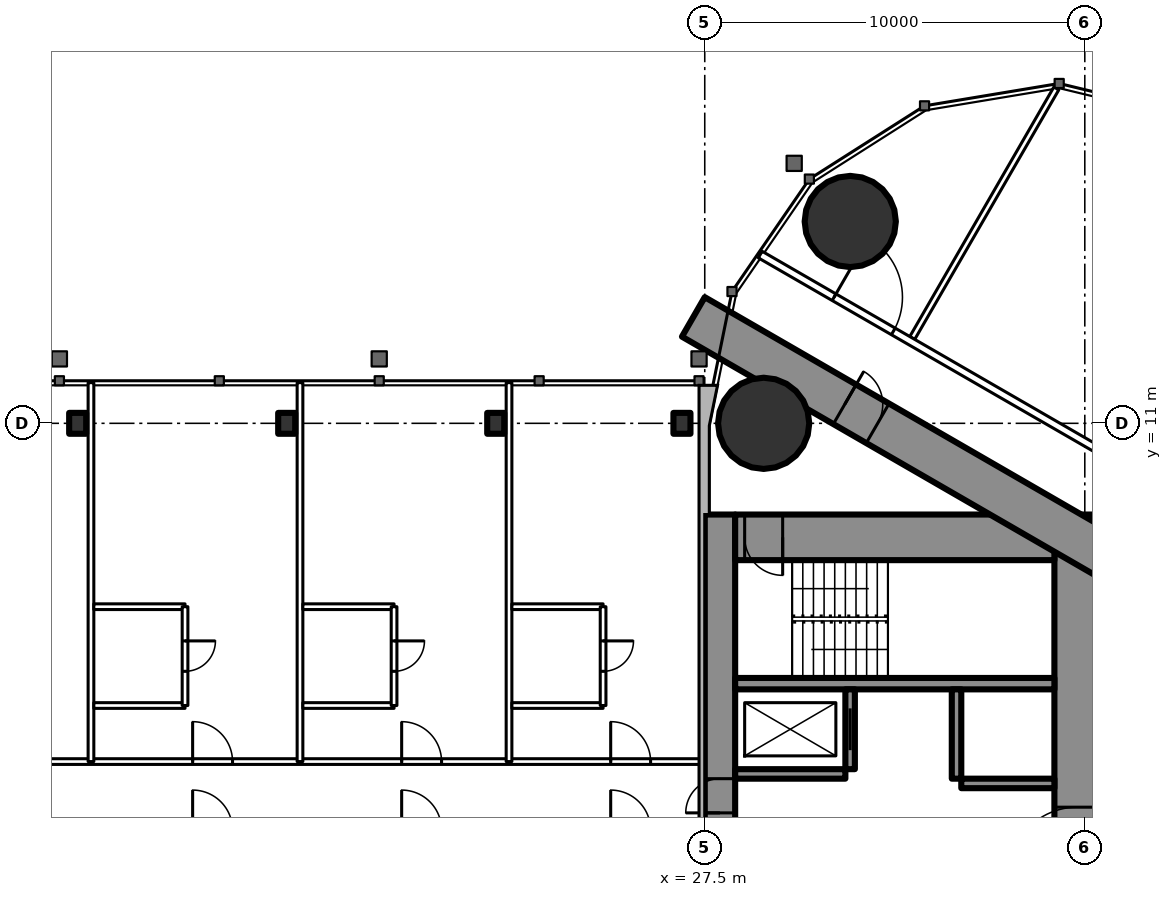
"""IFC4 building model, lengths in metres.
Left out: names, types, materials, properties, quantities, classifications, styles, units other than length and angle.
Written with IfcOpenShell. Run it as: python <this file> out.ifc"""

import sys

from ifc_helpers import new_model, si_unit, direction, frame, frame_2d, origin, origin_2d, place, context, subcontext, project, spatial, rectangle, circle, i_section, extrude, element, fill, save


model = new_model("IFC4")
c1 = context("Model", 3, precision=1e-05, world=origin(), true_north=direction((0.0, 1.0)))
c2 = subcontext(c1, "Body", "Model", "MODEL_VIEW")
j1 = project(units=[si_unit("LENGTHUNIT", "METRE"), si_unit("PLANEANGLEUNIT", "RADIAN")], contexts=[c1])
p1 = place(None, origin())
s1 = spatial("IfcSite", under=j1, at=p1, CompositionType="ELEMENT")
p2 = place(p1, origin())
s2 = spatial("IfcBuilding", under=s1, at=p2, CompositionType="ELEMENT")
p3 = place(p2, frame((0.0, 0.0, 244.1)))
s3 = spatial("IfcBuildingStorey", under=s2, at=p3, CompositionType="ELEMENT", Elevation=244.1)
for number, where, z_axis, x_axis in (
    (1, (31.328, 16.311, 0.0), (0.0, 0.0, 1.0), (1.0, 0.0, 0.0)),
    (2, (29.05, 11.0, 0.0), (0.0, 0.0, 1.0), (1.0, 0.0, 0.0)),
):
    element("IfcColumn", number, at=place(p3, frame(where, z_axis=z_axis, x_axis=x_axis)), inside=s3, PredefinedType="COLUMN", context=c2, shape_type="SweptSolid", body=[
        extrude(circle(Radius=1.2, at=origin_2d()), origin(), (0.0, 0.0, 1.0), 3.6),
    ])
p4 = place(p3, frame((27.9, -8.6, 0.0), z_axis=(0.0, 0.0, 1.0), x_axis=(0.0, 1.0, 0.0)))
e3 = element("IfcWall", 3, at=p4, inside=s3, PredefinedType="SHEAR", context=c2, shape_type="SweptSolid", body=[
    extrude(rectangle(XDim=17.2, YDim=0.8, at=frame_2d((8.6, 0.0))), origin(), (0.0, 0.0, 1.0), 3.6),
])
p5 = place(p4, frame((9.35, 0.0, 0.0)))
e4 = element("IfcOpeningElement", 4, at=p5, cuts=e3, PredefinedType="OPENING", context=c2, shape_type="SweptSolid", body=[
    extrude(rectangle(XDim=0.9, YDim=2.2, at=frame_2d((0.45, 1.1))), frame((0.0, 0.41, 0.0), z_axis=(0.0, -1.0, 0.0), x_axis=(1.0, 0.0, 0.0)), (0.0, 0.0, 1.0), 0.82),
])
p6 = place(p3, frame((37.3, -8.6, 0.0), z_axis=(0.0, 0.0, 1.0), x_axis=(0.0, 1.0, 0.0)))
e5 = element("IfcWall", 5, at=p6, inside=s3, PredefinedType="SHEAR", context=c2, shape_type="SweptSolid", body=[
    extrude(rectangle(XDim=17.2, YDim=1.2, at=frame_2d((8.6, 0.0))), origin(), (0.0, 0.0, 1.0), 3.6),
])
p7 = place(p6, frame((7.7, 0.0, 0.0)))
e6 = element("IfcOpeningElement", 6, at=p7, cuts=e5, PredefinedType="OPENING", context=c2, shape_type="SweptSolid", body=[
    extrude(rectangle(XDim=1.8, YDim=2.2, at=frame_2d((0.9, 1.1))), frame((0.0, 0.61, 0.0), z_axis=(0.0, -1.0, 0.0), x_axis=(1.0, 0.0, 0.0)), (0.0, 0.0, 1.0), 1.22),
])
p8 = place(p3, frame((28.3, 8.0, 0.0), z_axis=(0.0, 0.0, 1.0), x_axis=(1.0, 0.0, 0.0)))
e7 = element("IfcWall", 7, at=p8, inside=s3, PredefinedType="SHEAR", context=c2, shape_type="SweptSolid", body=[
    extrude(rectangle(XDim=8.4, YDim=1.2, at=frame_2d((4.2, 0.0))), origin(), (0.0, 0.0, 1.0), 3.6),
])
p9 = place(p8, frame((0.25, 0.0, 0.0)))
e8 = element("IfcOpeningElement", 8, at=p9, cuts=e7, PredefinedType="OPENING", context=c2, shape_type="SweptSolid", body=[
    extrude(rectangle(XDim=1.0, YDim=2.2, at=frame_2d((0.5, 1.1))), frame((0.0, 0.61, 0.0), z_axis=(0.0, -1.0, 0.0), x_axis=(1.0, 0.0, 0.0)), (0.0, 0.0, 1.0), 1.22),
])
p10 = place(p3, frame((28.3, 4.15, 0.0), z_axis=(0.0, 0.0, 1.0), x_axis=(1.0, 0.0, 0.0)))
e9 = element("IfcWall", 9, at=p10, inside=s3, PredefinedType="SHEAR", context=c2, shape_type="SweptSolid", body=[
    extrude(rectangle(XDim=8.4, YDim=0.3, at=frame_2d((4.2, 0.0))), origin(), (0.0, 0.0, 1.0), 3.6),
])
p11 = place(p3, frame((31.325, 1.9, 0.0), z_axis=(0.0, 0.0, 1.0), x_axis=(0.0, 1.0, 0.0)))
e10 = element("IfcWall", 10, at=p11, inside=s3, PredefinedType="SHEAR", context=c2, shape_type="SweptSolid", body=[
    extrude(rectangle(XDim=2.1, YDim=0.25, at=frame_2d((1.05, 0.0))), origin(), (0.0, 0.0, 1.0), 3.6),
])
p12 = place(p11, frame((0.5, 0.0, 0.0)))
e11 = element("IfcOpeningElement", 11, at=p12, cuts=e10, PredefinedType="OPENING", context=c2, shape_type="SweptSolid", body=[
    extrude(rectangle(XDim=1.1, YDim=2.2, at=frame_2d((0.55, 1.1))), frame((0.0, 0.135, 0.0), z_axis=(0.0, -1.0, 0.0), x_axis=(1.0, 0.0, 0.0)), (0.0, 0.0, 1.0), 0.27),
])
p13 = place(p3, frame((34.125, 1.65, 0.0), z_axis=(0.0, 0.0, 1.0), x_axis=(0.0, 1.0, 0.0)))
e12 = element("IfcWall", 12, at=p13, inside=s3, PredefinedType="SHEAR", context=c2, shape_type="SweptSolid", body=[
    extrude(rectangle(XDim=2.35, YDim=0.25, at=frame_2d((1.175, 0.0))), origin(), (0.0, 0.0, 1.0), 3.6),
])
p14 = place(p3, frame((28.3, 1.775, 0.0), z_axis=(0.0, 0.0, 1.0), x_axis=(1.0, 0.0, 0.0)))
e13 = element("IfcWall", 13, at=p14, inside=s3, PredefinedType="SHEAR", context=c2, shape_type="SweptSolid", body=[
    extrude(rectangle(XDim=2.9, YDim=0.25, at=frame_2d((1.45, 0.0))), origin(), (0.0, 0.0, 1.0), 3.6),
])
p15 = place(p3, frame((34.25, 1.525, 0.0), z_axis=(0.0, 0.0, 1.0), x_axis=(1.0, 0.0, 0.0)))
e14 = element("IfcWall", 14, at=p15, inside=s3, PredefinedType="SHEAR", context=c2, shape_type="SweptSolid", body=[
    extrude(rectangle(XDim=2.45, YDim=0.25, at=frame_2d((1.225, 0.0))), origin(), (0.0, 0.0, 1.0), 3.6),
])
p16 = place(p3, frame((27.2, -13.8, 0.0), z_axis=(0.0, 0.0, 1.0), x_axis=(0.866027159892, 0.499996958321, 0.0)))
e15 = element("IfcWall", 15, at=p16, inside=s3, PredefinedType="SHEAR", context=c2, shape_type="SweptSolid", body=[
    extrude(rectangle(XDim=27.947, YDim=1.2, at=frame_2d((13.973, 0.0))), origin(), (0.0, 0.0, 1.0), 3.6),
])
p17 = place(p16, frame((4.6, 0.0, 0.0)))
e16 = element("IfcOpeningElement", 16, at=p17, cuts=e15, PredefinedType="OPENING", context=c2, shape_type="SweptSolid", body=[
    extrude(rectangle(XDim=1.0, YDim=2.2, at=frame_2d((0.5, 1.1))), frame((0.0, 0.61, 0.0), z_axis=(0.0, -1.0, 0.0), x_axis=(1.0, 0.0, 0.0)), (0.0, 0.0, 1.0), 1.22),
])
p18 = place(p16, frame((13.395, 0.0, 0.0)))
e17 = element("IfcOpeningElement", 17, at=p18, cuts=e15, PredefinedType="OPENING", context=c2, shape_type="SweptSolid", body=[
    extrude(rectangle(XDim=1.8, YDim=2.2, at=frame_2d((0.9, 1.1))), frame((0.0, 0.61, 0.0), z_axis=(0.0, -1.0, 0.0), x_axis=(1.0, 0.0, 0.0)), (0.0, 0.0, 1.0), 1.22),
])
p19 = place(p3, frame((27.2, 13.8, 0.0), z_axis=(0.0, 0.0, 1.0), x_axis=(0.866024515034, -0.500001539357, 0.0)))
e18 = element("IfcWall", 18, at=p19, inside=s3, PredefinedType="SHEAR", context=c2, shape_type="SweptSolid", body=[
    extrude(rectangle(XDim=26.907, YDim=1.2, at=frame_2d((13.454, 0.0))), origin(), (0.0, 0.0, 1.0), 3.6),
])
p20 = place(p19, frame((4.6, 0.0, 0.0)))
e19 = element("IfcOpeningElement", 19, at=p20, cuts=e18, PredefinedType="OPENING", context=c2, shape_type="SweptSolid", body=[
    extrude(rectangle(XDim=1.0, YDim=2.2, at=frame_2d((0.5, 1.1))), frame((0.0, 0.61, 0.0), z_axis=(0.0, -1.0, 0.0), x_axis=(1.0, 0.0, 0.0)), (0.0, 0.0, 1.0), 1.22),
])
p21 = place(p19, frame((13.395, 0.0, 0.0)))
e20 = element("IfcOpeningElement", 20, at=p21, cuts=e18, PredefinedType="OPENING", context=c2, shape_type="SweptSolid", body=[
    extrude(rectangle(XDim=1.8, YDim=2.2, at=frame_2d((0.9, 1.1))), frame((0.0, 0.61, 0.0), z_axis=(0.0, -1.0, 0.0), x_axis=(1.0, 0.0, 0.0)), (0.0, 0.0, 1.0), 1.22),
])
for number, where, z_axis, x_axis in (
    (21, (11.0, 11.0, 0.0), (0.0, 0.0, 1.0), (1.0, 0.0, 0.0)),
    (22, (16.5, 11.0, 0.0), (0.0, 0.0, 1.0), (1.0, 0.0, 0.0)),
    (23, (22.0, 11.0, 0.0), (0.0, 0.0, 1.0), (1.0, 0.0, 0.0)),
    (24, (26.9, 11.0, 0.0), (0.0, 0.0, 1.0), (1.0, 0.0, 0.0)),
):
    element("IfcColumn", number, at=place(p3, frame(where, z_axis=z_axis, x_axis=x_axis)), inside=s3, PredefinedType="COLUMN", context=c2, shape_type="SweptSolid", body=[
        extrude(i_section(OverallWidth=0.448, OverallDepth=0.55, WebThickness=0.072, FlangeThickness=0.115, FilletRadius=0.02, at=origin_2d()), origin(), (0.0, 0.0, 1.0), 3.6),
    ])
p22 = place(p3, frame((32.96, 13.246, 0.0), z_axis=(0.0, 0.0, 1.0), x_axis=(0.500000236886, 0.866025267018, 0.0)))
e25 = element("IfcWall", 25, at=p22, inside=s3, PredefinedType="PARTITIONING", context=c2, shape_type="SweptSolid", body=[
    extrude(rectangle(XDim=7.583, YDim=0.15, at=frame_2d((3.791, 0.0))), origin(), (0.0, 0.0, 1.0), 3.35),
])
p23 = place(p3, frame((28.959, 15.44, 0.0), z_axis=(0.0, 0.0, 1.0), x_axis=(0.866028936079, -0.499993881836, 0.0)))
e26 = element("IfcWall", 26, at=p23, inside=s3, PredefinedType="PARTITIONING", context=c2, shape_type="SweptSolid", body=[
    extrude(rectangle(XDim=20.503, YDim=0.2, at=frame_2d((10.251, 0.0))), origin(), (0.0, 0.0, 1.0), 3.35),
])
p24 = place(p23, frame((18.953, 0.0, 0.0)))
e27 = element("IfcOpeningElement", 27, at=p24, cuts=e26, PredefinedType="OPENING", context=c2, shape_type="SweptSolid", body=[
    extrude(rectangle(XDim=0.95, YDim=2.2, at=frame_2d((0.475, 1.1))), frame((0.0, 0.11, 0.0), z_axis=(0.0, -1.0, 0.0), x_axis=(1.0, 0.0, 0.0)), (0.0, 0.0, 1.0), 0.22),
])
p25 = place(p23, frame((14.437, 0.0, 0.0)))
e28 = element("IfcOpeningElement", 28, at=p25, cuts=e26, PredefinedType="OPENING", context=c2, shape_type="SweptSolid", body=[
    extrude(rectangle(XDim=0.95, YDim=2.2, at=frame_2d((0.475, 1.1))), frame((0.0, 0.11, 0.0), z_axis=(0.0, -1.0, 0.0), x_axis=(1.0, 0.0, 0.0)), (0.0, 0.0, 1.0), 0.22),
])
p26 = place(p23, frame((2.244, 0.0, 0.0)))
e29 = element("IfcOpeningElement", 29, at=p26, cuts=e26, PredefinedType="OPENING", context=c2, shape_type="SweptSolid", body=[
    extrude(rectangle(XDim=1.8, YDim=2.04, at=frame_2d((0.9, 1.02))), frame((0.0, 0.11, 0.0), z_axis=(0.0, -1.0, 0.0), x_axis=(1.0, 0.0, 0.0)), (0.0, 0.0, 1.0), 0.22),
])
p27 = place(p3, frame((-10.65, 2.1, 0.0), z_axis=(0.0, 0.0, 1.0), x_axis=(1.0, 0.0, 0.0)))
e30 = element("IfcWall", 30, at=p27, inside=s3, PredefinedType="PARTITIONING", context=c2, shape_type="SweptSolid", body=[
    extrude(rectangle(XDim=38.15, YDim=0.15, at=frame_2d((19.075, 0.0))), origin(), (0.0, 0.0, 1.0), 3.4),
])
p28 = place(p27, frame((2.675, 0.0, 0.0)))
e31 = element("IfcOpeningElement", 31, at=p28, cuts=e30, PredefinedType="OPENING", context=c2, shape_type="SweptSolid", body=[
    extrude(rectangle(XDim=1.05, YDim=2.4, at=frame_2d((0.525, 1.2))), frame((0.0, 0.085, 0.0), z_axis=(0.0, -1.0, 0.0), x_axis=(1.0, 0.0, 0.0)), (0.0, 0.0, 1.0), 0.17),
])
p29 = place(p27, frame((13.675, 0.0, 0.0)))
e32 = element("IfcOpeningElement", 32, at=p29, cuts=e30, PredefinedType="OPENING", context=c2, shape_type="SweptSolid", body=[
    extrude(rectangle(XDim=1.05, YDim=2.4, at=frame_2d((0.525, 1.2))), frame((0.0, 0.085, 0.0), z_axis=(0.0, -1.0, 0.0), x_axis=(1.0, 0.0, 0.0)), (0.0, 0.0, 1.0), 0.17),
])
p30 = place(p27, frame((24.675, 0.0, 0.0)))
e33 = element("IfcOpeningElement", 33, at=p30, cuts=e30, PredefinedType="OPENING", context=c2, shape_type="SweptSolid", body=[
    extrude(rectangle(XDim=1.05, YDim=2.4, at=frame_2d((0.525, 1.2))), frame((0.0, 0.085, 0.0), z_axis=(0.0, -1.0, 0.0), x_axis=(1.0, 0.0, 0.0)), (0.0, 0.0, 1.0), 0.17),
])
p31 = place(p27, frame((30.175, 0.0, 0.0)))
e34 = element("IfcOpeningElement", 34, at=p31, cuts=e30, PredefinedType="OPENING", context=c2, shape_type="SweptSolid", body=[
    extrude(rectangle(XDim=1.05, YDim=2.4, at=frame_2d((0.525, 1.2))), frame((0.0, 0.085, 0.0), z_axis=(0.0, -1.0, 0.0), x_axis=(1.0, 0.0, 0.0)), (0.0, 0.0, 1.0), 0.17),
])
p32 = place(p27, frame((35.675, 0.0, 0.0)))
e35 = element("IfcOpeningElement", 35, at=p32, cuts=e30, PredefinedType="OPENING", context=c2, shape_type="SweptSolid", body=[
    extrude(rectangle(XDim=1.05, YDim=2.4, at=frame_2d((0.525, 1.2))), frame((0.0, 0.085, 0.0), z_axis=(0.0, -1.0, 0.0), x_axis=(1.0, 0.0, 0.0)), (0.0, 0.0, 1.0), 0.17),
])
for number, where, z_axis, x_axis in (
    (36, (11.35, 2.1, 0.0), (0.0, 0.0, 1.0), (0.0, 1.0, 0.0)),
    (37, (16.85, 2.1, 0.0), (0.0, 0.0, 1.0), (0.0, 1.0, 0.0)),
    (38, (22.35, 2.1, 0.0), (0.0, 0.0, 1.0), (0.0, 1.0, 0.0)),
):
    element("IfcWall", number, at=place(p3, frame(where, z_axis=z_axis, x_axis=x_axis)), inside=s3, PredefinedType="PARTITIONING", context=c2, shape_type="SweptSolid", body=[
        extrude(rectangle(XDim=9.97, YDim=0.15, at=frame_2d((4.985, 0.0))), origin(), (0.0, 0.0, 1.0), 3.4),
    ])
for number, where, z_axis, x_axis in (
    (39, (11.425, 6.175, 0.0), (0.0, 0.0, 1.0), (1.0, 0.0, 0.0)),
    (40, (11.425, 3.575, 0.0), (0.0, 0.0, 1.0), (1.0, 0.0, 0.0)),
):
    element("IfcWall", number, at=place(p3, frame(where, z_axis=z_axis, x_axis=x_axis)), inside=s3, PredefinedType="PARTITIONING", context=c2, shape_type="SweptSolid", body=[
        extrude(rectangle(XDim=2.4, YDim=0.15, at=frame_2d((1.2, 0.0))), origin(), (0.0, 0.0, 1.0), 3.4),
    ])
p33 = place(p3, frame((13.825, 3.575, 0.0), z_axis=(0.0, 0.0, 1.0), x_axis=(0.0, 1.0, 0.0)))
e41 = element("IfcWall", 41, at=p33, inside=s3, PredefinedType="PARTITIONING", context=c2, shape_type="SweptSolid", body=[
    extrude(rectangle(XDim=2.6, YDim=0.15, at=frame_2d((1.3, 0.0))), origin(), (0.0, 0.0, 1.0), 3.4),
])
p34 = place(p33, frame((0.9, 0.0, 0.0)))
e42 = element("IfcOpeningElement", 42, at=p34, cuts=e41, PredefinedType="OPENING", context=c2, shape_type="SweptSolid", body=[
    extrude(rectangle(XDim=0.8, YDim=2.2, at=frame_2d((0.4, 1.1))), frame((0.0, 0.085, 0.0), z_axis=(0.0, -1.0, 0.0), x_axis=(1.0, 0.0, 0.0)), (0.0, 0.0, 1.0), 0.17),
])
for number, where, z_axis, x_axis in (
    (43, (16.925, 6.175, 0.0), (0.0, 0.0, 1.0), (1.0, 0.0, 0.0)),
    (44, (16.925, 3.575, 0.0), (0.0, 0.0, 1.0), (1.0, 0.0, 0.0)),
):
    element("IfcWall", number, at=place(p3, frame(where, z_axis=z_axis, x_axis=x_axis)), inside=s3, PredefinedType="PARTITIONING", context=c2, shape_type="SweptSolid", body=[
        extrude(rectangle(XDim=2.4, YDim=0.15, at=frame_2d((1.2, 0.0))), origin(), (0.0, 0.0, 1.0), 3.4),
    ])
p35 = place(p3, frame((19.325, 3.575, 0.0), z_axis=(0.0, 0.0, 1.0), x_axis=(0.0, 1.0, 0.0)))
e45 = element("IfcWall", 45, at=p35, inside=s3, PredefinedType="PARTITIONING", context=c2, shape_type="SweptSolid", body=[
    extrude(rectangle(XDim=2.6, YDim=0.15, at=frame_2d((1.3, 0.0))), origin(), (0.0, 0.0, 1.0), 3.4),
])
p36 = place(p35, frame((0.9, 0.0, 0.0)))
e46 = element("IfcOpeningElement", 46, at=p36, cuts=e45, PredefinedType="OPENING", context=c2, shape_type="SweptSolid", body=[
    extrude(rectangle(XDim=0.8, YDim=2.2, at=frame_2d((0.4, 1.1))), frame((0.0, 0.085, 0.0), z_axis=(0.0, -1.0, 0.0), x_axis=(1.0, 0.0, 0.0)), (0.0, 0.0, 1.0), 0.17),
])
for number, where, z_axis, x_axis in (
    (47, (22.425, 6.175, 0.0), (0.0, 0.0, 1.0), (1.0, 0.0, 0.0)),
    (48, (22.425, 3.575, 0.0), (0.0, 0.0, 1.0), (1.0, 0.0, 0.0)),
):
    element("IfcWall", number, at=place(p3, frame(where, z_axis=z_axis, x_axis=x_axis)), inside=s3, PredefinedType="PARTITIONING", context=c2, shape_type="SweptSolid", body=[
        extrude(rectangle(XDim=2.4, YDim=0.15, at=frame_2d((1.2, 0.0))), origin(), (0.0, 0.0, 1.0), 3.4),
    ])
p37 = place(p3, frame((24.825, 3.575, 0.0), z_axis=(0.0, 0.0, 1.0), x_axis=(0.0, 1.0, 0.0)))
e49 = element("IfcWall", 49, at=p37, inside=s3, PredefinedType="PARTITIONING", context=c2, shape_type="SweptSolid", body=[
    extrude(rectangle(XDim=2.6, YDim=0.15, at=frame_2d((1.3, 0.0))), origin(), (0.0, 0.0, 1.0), 3.4),
])
p38 = place(p37, frame((0.9, 0.0, 0.0)))
e50 = element("IfcOpeningElement", 50, at=p38, cuts=e49, PredefinedType="OPENING", context=c2, shape_type="SweptSolid", body=[
    extrude(rectangle(XDim=0.8, YDim=2.2, at=frame_2d((0.4, 1.1))), frame((0.0, 0.085, 0.0), z_axis=(0.0, -1.0, 0.0), x_axis=(1.0, 0.0, 0.0)), (0.0, 0.0, 1.0), 0.17),
])
p39 = place(p26, origin())
e51 = element("IfcDoor", 51, at=p39, inside=s3, OperationType="DOUBLE_DOOR_SINGLE_SWING", PredefinedType="DOOR", context=c2, shape_type="SweptSolid", body=[
    extrude(rectangle(XDim=1.8, YDim=2.04, at=frame_2d((0.9, 1.02))), frame((0.0, 0.025, 0.0), z_axis=(0.0, -1.0, 0.0), x_axis=(1.0, 0.0, 0.0)), (0.0, 0.0, 1.0), 0.05),
])
fill(e29, e51)
p40 = place(p20, origin())
e52 = element("IfcDoor", 52, at=p40, inside=s3, OperationType="SINGLE_SWING_LEFT", PredefinedType="DOOR", context=c2, shape_type="SweptSolid", body=[
    extrude(rectangle(XDim=1.0, YDim=2.2, at=frame_2d((0.5, 1.1))), frame((0.0, 0.025, 0.0), z_axis=(0.0, -1.0, 0.0), x_axis=(1.0, 0.0, 0.0)), (0.0, 0.0, 1.0), 0.05),
])
fill(e19, e52)
p41 = place(p7, origin())
e53 = element("IfcDoor", 53, at=p41, inside=s3, OperationType="DOUBLE_DOOR_SINGLE_SWING", PredefinedType="DOOR", context=c2, shape_type="SweptSolid", body=[
    extrude(rectangle(XDim=1.8, YDim=2.2, at=frame_2d((0.9, 1.1))), frame((0.0, 0.025, 0.0), z_axis=(0.0, -1.0, 0.0), x_axis=(1.0, 0.0, 0.0)), (0.0, 0.0, 1.0), 0.05),
])
fill(e6, e53)
p42 = place(p9, origin())
e54 = element("IfcDoor", 54, at=p42, inside=s3, OperationType="SINGLE_SWING_RIGHT", PredefinedType="DOOR", context=c2, shape_type="SweptSolid", body=[
    extrude(rectangle(XDim=1.0, YDim=2.2, at=frame_2d((0.5, 1.1))), frame((0.0, 0.025, 0.0), z_axis=(0.0, -1.0, 0.0), x_axis=(1.0, 0.0, 0.0)), (0.0, 0.0, 1.0), 0.05),
])
fill(e8, e54)
p43 = place(p5, origin())
e55 = element("IfcDoor", 55, at=p43, inside=s3, OperationType="SINGLE_SWING_LEFT", PredefinedType="DOOR", context=c2, shape_type="SweptSolid", body=[
    extrude(rectangle(XDim=0.9, YDim=2.2, at=frame_2d((0.45, 1.1))), frame((0.0, 0.025, 0.0), z_axis=(0.0, -1.0, 0.0), x_axis=(1.0, 0.0, 0.0)), (0.0, 0.0, 1.0), 0.05),
])
fill(e4, e55)
p44 = place(p34, origin())
e56 = element("IfcDoor", 56, at=p44, inside=s3, OperationType="SINGLE_SWING_RIGHT", PredefinedType="DOOR", context=c2, shape_type="SweptSolid", body=[
    extrude(rectangle(XDim=0.8, YDim=2.2, at=frame_2d((0.4, 1.1))), frame((0.0, 0.025, 0.0), z_axis=(0.0, -1.0, 0.0), x_axis=(1.0, 0.0, 0.0)), (0.0, 0.0, 1.0), 0.05),
])
fill(e42, e56)
p45 = place(p30, origin())
e57 = element("IfcDoor", 57, at=p45, inside=s3, OperationType="SINGLE_SWING_LEFT", PredefinedType="DOOR", context=c2, shape_type="SweptSolid", body=[
    extrude(rectangle(XDim=1.05, YDim=2.4, at=frame_2d((0.525, 1.2))), frame((0.0, 0.025, 0.0), z_axis=(0.0, -1.0, 0.0), x_axis=(1.0, 0.0, 0.0)), (0.0, 0.0, 1.0), 0.05),
])
fill(e33, e57)
p46 = place(p36, origin())
e58 = element("IfcDoor", 58, at=p46, inside=s3, OperationType="SINGLE_SWING_RIGHT", PredefinedType="DOOR", context=c2, shape_type="SweptSolid", body=[
    extrude(rectangle(XDim=0.8, YDim=2.2, at=frame_2d((0.4, 1.1))), frame((0.0, 0.025, 0.0), z_axis=(0.0, -1.0, 0.0), x_axis=(1.0, 0.0, 0.0)), (0.0, 0.0, 1.0), 0.05),
])
fill(e46, e58)
p47 = place(p31, origin())
e59 = element("IfcDoor", 59, at=p47, inside=s3, OperationType="SINGLE_SWING_LEFT", PredefinedType="DOOR", context=c2, shape_type="SweptSolid", body=[
    extrude(rectangle(XDim=1.05, YDim=2.4, at=frame_2d((0.525, 1.2))), frame((0.0, 0.025, 0.0), z_axis=(0.0, -1.0, 0.0), x_axis=(1.0, 0.0, 0.0)), (0.0, 0.0, 1.0), 0.05),
])
fill(e34, e59)
p48 = place(p38, origin())
e60 = element("IfcDoor", 60, at=p48, inside=s3, OperationType="SINGLE_SWING_RIGHT", PredefinedType="DOOR", context=c2, shape_type="SweptSolid", body=[
    extrude(rectangle(XDim=0.8, YDim=2.2, at=frame_2d((0.4, 1.1))), frame((0.0, 0.025, 0.0), z_axis=(0.0, -1.0, 0.0), x_axis=(1.0, 0.0, 0.0)), (0.0, 0.0, 1.0), 0.05),
])
fill(e50, e60)
p49 = place(p32, origin())
e61 = element("IfcDoor", 61, at=p49, inside=s3, OperationType="SINGLE_SWING_LEFT", PredefinedType="DOOR", context=c2, shape_type="SweptSolid", body=[
    extrude(rectangle(XDim=1.05, YDim=2.4, at=frame_2d((0.525, 1.2))), frame((0.0, 0.025, 0.0), z_axis=(0.0, -1.0, 0.0), x_axis=(1.0, 0.0, 0.0)), (0.0, 0.0, 1.0), 0.05),
])
fill(e35, e61)
p50 = place(p12, origin())
e62 = element("IfcDoor", 62, at=p50, inside=s3, OperationType="SLIDING_TO_LEFT", PredefinedType="USERDEFINED", context=c2, shape_type="SweptSolid", body=[
    extrude(rectangle(XDim=1.1, YDim=2.2, at=frame_2d((0.55, 1.1))), frame((0.0, 0.025, 0.0), z_axis=(0.0, -1.0, 0.0), x_axis=(1.0, 0.0, 0.0)), (0.0, 0.0, 1.0), 0.05),
])
fill(e11, e62)
save(model, sys.argv[1])
